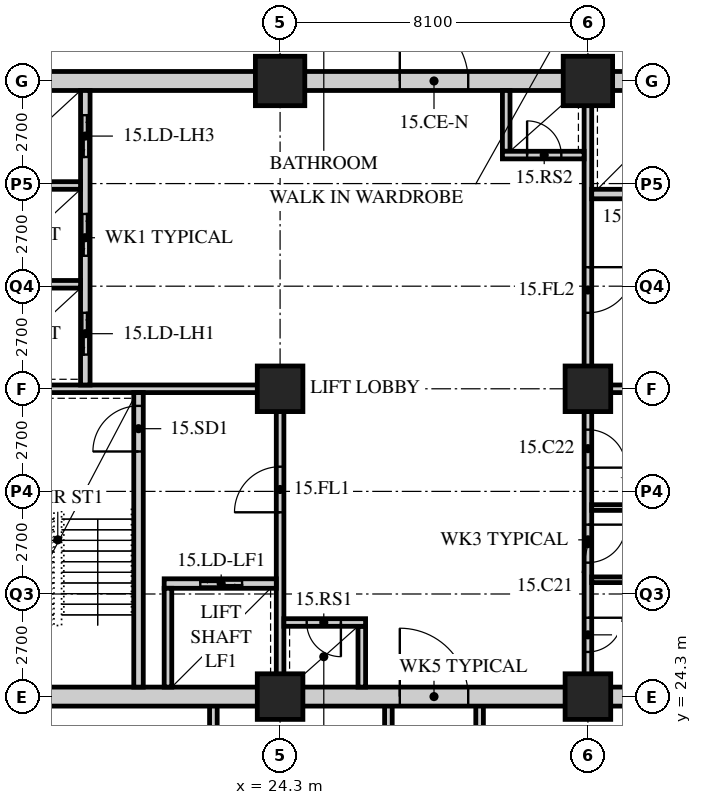
"""IFC4 building model, lengths in metres.
Left out: names, types, materials, properties, quantities, classifications, styles, units other than length and angle.
Written with IfcOpenShell. Run it as: python <this file> out.ifc"""

import sys

from ifc_helpers import new_model, si_unit, direction, frame, frame_2d, origin, origin_2d, place, context, subcontext, project, spatial, rectangle, hollow_rectangle, extrude, element, fill, save


model = new_model("IFC4")
c1 = context("Model", 3, precision=1e-05, world=origin(), true_north=direction((0.0, 1.0)))
c2 = subcontext(c1, "Body", "Model", "MODEL_VIEW")
j1 = project(units=[si_unit("LENGTHUNIT", "METRE"), si_unit("PLANEANGLEUNIT", "RADIAN")], contexts=[c1])
p1 = place(None, origin())
s1 = spatial("IfcSite", under=j1, at=p1, CompositionType="ELEMENT")
p2 = place(p1, origin())
s2 = spatial("IfcBuilding", under=s1, at=p2, CompositionType="ELEMENT")
p3 = place(p2, frame((0.0, 0.0, 63.6)))
s3 = spatial("IfcBuildingStorey", under=s2, at=p3, CompositionType="ELEMENT", Elevation=63.6)
for number, where, z_axis, x_axis in (
    (1, (24.3, 24.3, 0.0), (0.0, 0.0, 1.0), (1.0, 0.0, 0.0)),
    (2, (24.3, 32.4, 0.0), (0.0, 0.0, 1.0), (1.0, 0.0, 0.0)),
):
    element("IfcColumn", number, at=place(p3, frame(where, z_axis=z_axis, x_axis=x_axis)), inside=s3, PredefinedType="COLUMN", context=c2, shape_type="SweptSolid", body=[
        extrude(hollow_rectangle(XDim=1.2, YDim=1.2, WallThickness=0.12, at=origin_2d()), origin(), (0.0, 0.0, 1.0), 3.4),
    ])
p4 = place(p3, frame((24.3, 40.5, 0.0), z_axis=(0.0, 0.0, 1.0), x_axis=(1.0, 0.0, 0.0)))
e3 = element("IfcColumn", 3, at=p4, inside=s3, PredefinedType="COLUMN", context=c2, shape_type="SweptSolid", body=[
    extrude(hollow_rectangle(XDim=1.3, YDim=1.3, WallThickness=0.13, at=origin_2d()), origin(), (0.0, 0.0, 1.0), 3.4),
])
for number, where, z_axis, x_axis in (
    (4, (32.4, 24.3, 0.0), (0.0, 0.0, 1.0), (1.0, 0.0, 0.0)),
    (5, (32.4, 32.4, 0.0), (0.0, 0.0, 1.0), (1.0, 0.0, 0.0)),
):
    element("IfcColumn", number, at=place(p3, frame(where, z_axis=z_axis, x_axis=x_axis)), inside=s3, PredefinedType="COLUMN", context=c2, shape_type="SweptSolid", body=[
        extrude(hollow_rectangle(XDim=1.2, YDim=1.2, WallThickness=0.12, at=origin_2d()), origin(), (0.0, 0.0, 1.0), 3.4),
    ])
p5 = place(p3, frame((32.4, 40.5, 0.0), z_axis=(0.0, 0.0, 1.0), x_axis=(1.0, 0.0, 0.0)))
e6 = element("IfcColumn", 6, at=p5, inside=s3, PredefinedType="COLUMN", context=c2, shape_type="SweptSolid", body=[
    extrude(hollow_rectangle(XDim=1.3, YDim=1.3, WallThickness=0.13, at=origin_2d()), origin(), (0.0, 0.0, 1.0), 3.4),
])
for number, where, z_axis, x_axis in (
    (7, (22.545, 13.95, 0.0), (0.0, 0.0, 1.0), (0.0, 1.0, 0.0)),
    (8, (27.15, 13.95, 0.0), (0.0, 0.0, 1.0), (0.0, 1.0, 0.0)),
    (9, (29.55, 13.95, 0.0), (0.0, 0.0, 1.0), (0.0, 1.0, 0.0)),
):
    element("IfcWall", number, at=place(p3, frame(where, z_axis=z_axis, x_axis=x_axis)), inside=s3, PredefinedType="SOLIDWALL", context=c2, shape_type="SweptSolid", body=[
        extrude(rectangle(XDim=10.35, YDim=0.2, at=frame_2d((5.175, 0.0))), origin(), (0.0, 0.0, 1.0), 3.19),
    ])
p6 = place(p3, frame((15.95, 24.3, 0.0), z_axis=(0.0, 0.0, 1.0), x_axis=(1.0, 0.0, 0.0)))
e10 = element("IfcWall", 10, at=p6, inside=s3, PredefinedType="SOLIDWALL", context=c2, shape_type="SweptSolid", body=[
    extrude(rectangle(XDim=24.8, YDim=0.5, at=frame_2d((12.4, 0.0))), origin(), (0.0, 0.0, 1.0), 2.54),
])
p7 = place(p6, frame((11.5, 0.0, 0.0)))
e11 = element("IfcOpeningElement", 11, at=p7, cuts=e10, PredefinedType="OPENING", context=c2, shape_type="SweptSolid", body=[
    extrude(rectangle(XDim=1.8, YDim=2.4, at=frame_2d((0.9, 1.2))), frame((0.0, 0.26, 0.0), z_axis=(0.0, -1.0, 0.0), x_axis=(1.0, 0.0, 0.0)), (0.0, 0.0, 1.0), 0.52),
])
p8 = place(p3, frame((15.95, 40.5, 0.0), z_axis=(0.0, 0.0, 1.0), x_axis=(1.0, 0.0, 0.0)))
e12 = element("IfcWall", 12, at=p8, inside=s3, PredefinedType="SOLIDWALL", context=c2, shape_type="SweptSolid", body=[
    extrude(rectangle(XDim=24.8, YDim=0.5, at=frame_2d((12.4, 0.0))), origin(), (0.0, 0.0, 1.0), 2.54),
])
p9 = place(p8, frame((11.5, 0.0, 0.0)))
e13 = element("IfcOpeningElement", 13, at=p9, cuts=e12, PredefinedType="OPENING", context=c2, shape_type="SweptSolid", body=[
    extrude(rectangle(XDim=1.8, YDim=2.4, at=frame_2d((0.9, 1.2))), frame((0.0, 0.26, 0.0), z_axis=(0.0, -1.0, 0.0), x_axis=(1.0, 0.0, 0.0)), (0.0, 0.0, 1.0), 0.52),
])
p10 = place(p3, frame((16.45, 32.4, 0.0), z_axis=(0.0, 0.0, 1.0), x_axis=(1.0, 0.0, 0.0)))
e14 = element("IfcWall", 14, at=p10, inside=s3, PredefinedType="SOLIDWALL", context=c2, shape_type="SweptSolid", body=[
    extrude(rectangle(XDim=7.95, YDim=0.2, at=frame_2d((3.975, 0.0))), origin(), (0.0, 0.0, 1.0), 2.578),
])
p11 = place(p3, frame((24.3, 24.55, 0.0), z_axis=(0.0, 0.0, 1.0), x_axis=(0.0, 1.0, 0.0)))
e15 = element("IfcWall", 15, at=p11, inside=s3, PredefinedType="SOLIDWALL", context=c2, shape_type="SweptSolid", body=[
    extrude(rectangle(XDim=7.75, YDim=0.2, at=frame_2d((3.875, 0.0))), origin(), (0.0, 0.0, 1.0), 2.578),
])
p12 = place(p11, frame((4.6, 0.0, 0.0)))
e16 = element("IfcOpeningElement", 16, at=p12, cuts=e15, PredefinedType="OPENING", context=c2, shape_type="SweptSolid", body=[
    extrude(rectangle(XDim=1.2, YDim=2.1, at=frame_2d((0.6, 1.05))), frame((0.0, 0.11, 0.0), z_axis=(0.0, -1.0, 0.0), x_axis=(1.0, 0.0, 0.0)), (0.0, 0.0, 1.0), 0.22),
])
p13 = place(p3, frame((20.575, 24.55, 0.0), z_axis=(0.0, 0.0, 1.0), x_axis=(0.0, 1.0, 0.0)))
e17 = element("IfcWall", 17, at=p13, inside=s3, PredefinedType="SOLIDWALL", context=c2, shape_type="SweptSolid", body=[
    extrude(rectangle(XDim=7.75, YDim=0.25, at=frame_2d((3.875, 0.0))), origin(), (0.0, 0.0, 1.0), 3.19),
])
p14 = place(p13, frame((6.2, 0.0, 0.0)))
e18 = element("IfcOpeningElement", 18, at=p14, cuts=e17, PredefinedType="OPENING", context=c2, shape_type="SweptSolid", body=[
    extrude(rectangle(XDim=1.2, YDim=2.1, at=frame_2d((0.6, 1.05))), frame((0.0, 0.135, 0.0), z_axis=(0.0, -1.0, 0.0), x_axis=(1.0, 0.0, 0.0)), (0.0, 0.0, 1.0), 0.27),
])
p15 = place(p3, frame((21.25, 27.275, 0.0), z_axis=(0.0, 0.0, 1.0), x_axis=(1.0, 0.0, 0.0)))
e19 = element("IfcWall", 19, at=p15, inside=s3, PredefinedType="SOLIDWALL", context=c2, shape_type="SweptSolid", body=[
    extrude(rectangle(XDim=2.95, YDim=0.25, at=frame_2d((1.475, 0.0))), origin(), (0.0, 0.0, 1.0), 3.19),
])
p16 = place(p15, frame((0.95, 0.0, 0.0)))
e20 = element("IfcOpeningElement", 20, at=p16, cuts=e19, PredefinedType="OPENING", context=c2, shape_type="SweptSolid", body=[
    extrude(rectangle(XDim=1.1, YDim=2.4, at=frame_2d((0.55, 1.2))), frame((0.0, 0.135, 0.0), z_axis=(0.0, -1.0, 0.0), x_axis=(1.0, 0.0, 0.0)), (0.0, 0.0, 1.0), 0.27),
])
p17 = place(p3, frame((21.35, 24.55, 0.0), z_axis=(0.0, 0.0, 1.0), x_axis=(0.0, 1.0, 0.0)))
e21 = element("IfcWall", 21, at=p17, inside=s3, PredefinedType="SOLIDWALL", context=c2, shape_type="SweptSolid", body=[
    extrude(rectangle(XDim=2.6, YDim=0.2, at=frame_2d((1.3, 0.0))), origin(), (0.0, 0.0, 1.0), 3.19),
])
p18 = place(p3, frame((19.175, 32.5, 0.0), z_axis=(0.0, 0.0, 1.0), x_axis=(0.0, 1.0, 0.0)))
e22 = element("IfcWall", 22, at=p18, inside=s3, PredefinedType="SOLIDWALL", context=c2, shape_type="SweptSolid", body=[
    extrude(rectangle(XDim=7.75, YDim=0.25, at=frame_2d((3.875, 0.0))), origin(), (0.0, 0.0, 1.0), 3.19),
])
p19 = place(p18, frame((0.8, 0.0, 0.0)))
e23 = element("IfcOpeningElement", 23, at=p19, cuts=e22, PredefinedType="OPENING", context=c2, shape_type="SweptSolid", body=[
    extrude(rectangle(XDim=1.1, YDim=2.4, at=frame_2d((0.55, 1.2))), frame((0.0, 0.135, 0.0), z_axis=(0.0, -1.0, 0.0), x_axis=(1.0, 0.0, 0.0)), (0.0, 0.0, 1.0), 0.27),
])
p20 = place(p18, frame((3.4, 0.0, 0.0)))
e24 = element("IfcOpeningElement", 24, at=p20, cuts=e22, PredefinedType="OPENING", context=c2, shape_type="SweptSolid", body=[
    extrude(rectangle(XDim=1.1, YDim=2.4, at=frame_2d((0.55, 1.2))), frame((0.0, 0.135, 0.0), z_axis=(0.0, -1.0, 0.0), x_axis=(1.0, 0.0, 0.0)), (0.0, 0.0, 1.0), 0.27),
])
p21 = place(p18, frame((6.0, 0.0, 0.0)))
e25 = element("IfcOpeningElement", 25, at=p21, cuts=e22, PredefinedType="OPENING", context=c2, shape_type="SweptSolid", body=[
    extrude(rectangle(XDim=1.1, YDim=2.4, at=frame_2d((0.55, 1.2))), frame((0.0, 0.135, 0.0), z_axis=(0.0, -1.0, 0.0), x_axis=(1.0, 0.0, 0.0)), (0.0, 0.0, 1.0), 0.27),
])
for number, where, z_axis, x_axis in (
    (26, (16.45, 35.15, 0.0), (0.0, 0.0, 1.0), (1.0, 0.0, 0.0)),
    (27, (16.45, 37.75, 0.0), (0.0, 0.0, 1.0), (1.0, 0.0, 0.0)),
):
    element("IfcWall", number, at=place(p3, frame(where, z_axis=z_axis, x_axis=x_axis)), inside=s3, PredefinedType="SOLIDWALL", context=c2, shape_type="SweptSolid", body=[
        extrude(rectangle(XDim=2.6, YDim=0.2, at=frame_2d((1.3, 0.0))), origin(), (0.0, 0.0, 1.0), 3.19),
    ])
p22 = place(p3, frame((26.45, 24.55, 0.0), z_axis=(0.0, 0.0, 1.0), x_axis=(0.0, 1.0, 0.0)))
e28 = element("IfcWall", 28, at=p22, inside=s3, PredefinedType="SOLIDWALL", context=c2, shape_type="SweptSolid", body=[
    extrude(rectangle(XDim=1.6, YDim=0.2, at=frame_2d((0.8, 0.0))), origin(), (0.0, 0.0, 1.0), 3.19),
])
p23 = place(p3, frame((24.4, 26.25, 0.0), z_axis=(0.0, 0.0, 1.0), x_axis=(1.0, 0.0, 0.0)))
e29 = element("IfcWall", 29, at=p23, inside=s3, PredefinedType="SOLIDWALL", context=c2, shape_type="SweptSolid", body=[
    extrude(rectangle(XDim=2.15, YDim=0.2, at=frame_2d((1.075, 0.0))), origin(), (0.0, 0.0, 1.0), 3.19),
])
p24 = place(p23, frame((0.6, 0.0, 0.0)))
e30 = element("IfcOpeningElement", 30, at=p24, cuts=e29, PredefinedType="OPENING", context=c2, shape_type="SweptSolid", body=[
    extrude(rectangle(XDim=0.9, YDim=2.1, at=frame_2d((0.45, 1.05))), frame((0.0, 0.11, 0.0), z_axis=(0.0, -1.0, 0.0), x_axis=(1.0, 0.0, 0.0)), (0.0, 0.0, 1.0), 0.22),
])
p25 = place(p3, frame((32.3, 32.4, 0.0), z_axis=(0.0, 0.0, 1.0), x_axis=(1.0, 0.0, 0.0)))
e31 = element("IfcWall", 31, at=p25, inside=s3, PredefinedType="SOLIDWALL", context=c2, shape_type="SweptSolid", body=[
    extrude(rectangle(XDim=7.95, YDim=0.2, at=frame_2d((3.975, 0.0))), origin(), (0.0, 0.0, 1.0), 2.578),
])
p26 = place(p3, frame((32.4, 32.5, 0.0), z_axis=(0.0, 0.0, 1.0), x_axis=(0.0, 1.0, 0.0)))
e32 = element("IfcWall", 32, at=p26, inside=s3, PredefinedType="SOLIDWALL", context=c2, shape_type="SweptSolid", body=[
    extrude(rectangle(XDim=7.75, YDim=0.2, at=frame_2d((3.875, 0.0))), origin(), (0.0, 0.0, 1.0), 2.578),
])
p27 = place(p26, frame((1.9, 0.0, 0.0)))
e33 = element("IfcOpeningElement", 33, at=p27, cuts=e32, PredefinedType="OPENING", context=c2, shape_type="SweptSolid", body=[
    extrude(rectangle(XDim=1.2, YDim=2.1, at=frame_2d((0.6, 1.05))), frame((0.0, 0.11, 0.0), z_axis=(0.0, -1.0, 0.0), x_axis=(1.0, 0.0, 0.0)), (0.0, 0.0, 1.0), 0.22),
])
p28 = place(p3, frame((32.5, 37.525, 0.0), z_axis=(0.0, 0.0, 1.0), x_axis=(1.0, 0.0, 0.0)))
e34 = element("IfcWall", 34, at=p28, inside=s3, PredefinedType="SOLIDWALL", context=c2, shape_type="SweptSolid", body=[
    extrude(rectangle(XDim=2.95, YDim=0.25, at=frame_2d((1.475, 0.0))), origin(), (0.0, 0.0, 1.0), 3.19),
])
p29 = place(p28, frame((0.9, 0.0, 0.0)))
e35 = element("IfcOpeningElement", 35, at=p29, cuts=e34, PredefinedType="OPENING", context=c2, shape_type="SweptSolid", body=[
    extrude(rectangle(XDim=1.1, YDim=2.4, at=frame_2d((0.55, 1.2))), frame((0.0, 0.135, 0.0), z_axis=(0.0, -1.0, 0.0), x_axis=(1.0, 0.0, 0.0)), (0.0, 0.0, 1.0), 0.27),
])
p30 = place(p3, frame((30.25, 38.65, 0.0), z_axis=(0.0, 0.0, 1.0), x_axis=(0.0, 1.0, 0.0)))
e36 = element("IfcWall", 36, at=p30, inside=s3, PredefinedType="SOLIDWALL", context=c2, shape_type="SweptSolid", body=[
    extrude(rectangle(XDim=1.6, YDim=0.2, at=frame_2d((0.8, 0.0))), origin(), (0.0, 0.0, 1.0), 3.19),
])
p31 = place(p3, frame((30.15, 38.55, 0.0), z_axis=(0.0, 0.0, 1.0), x_axis=(1.0, 0.0, 0.0)))
e37 = element("IfcWall", 37, at=p31, inside=s3, PredefinedType="SOLIDWALL", context=c2, shape_type="SweptSolid", body=[
    extrude(rectangle(XDim=2.15, YDim=0.2, at=frame_2d((1.075, 0.0))), origin(), (0.0, 0.0, 1.0), 3.19),
])
p32 = place(p31, frame((0.65, 0.0, 0.0)))
e38 = element("IfcOpeningElement", 38, at=p32, cuts=e37, PredefinedType="OPENING", context=c2, shape_type="SweptSolid", body=[
    extrude(rectangle(XDim=0.9, YDim=2.1, at=frame_2d((0.45, 1.05))), frame((0.0, 0.11, 0.0), z_axis=(0.0, -1.0, 0.0), x_axis=(1.0, 0.0, 0.0)), (0.0, 0.0, 1.0), 0.22),
])
p33 = place(p3, frame((32.4, 24.55, 0.0), z_axis=(0.0, 0.0, 1.0), x_axis=(0.0, 1.0, 0.0)))
e39 = element("IfcWall", 39, at=p33, inside=s3, PredefinedType="PARTITIONING", context=c2, shape_type="SweptSolid", body=[
    extrude(rectangle(XDim=7.75, YDim=0.2, at=frame_2d((3.875, 0.0))), origin(), (0.0, 0.0, 1.0), 2.578),
])
p34 = place(p33, frame((0.925, 0.0, 0.0)))
e40 = element("IfcOpeningElement", 40, at=p34, cuts=e39, PredefinedType="OPENING", context=c2, shape_type="SweptSolid", body=[
    extrude(rectangle(XDim=0.9, YDim=2.1, at=frame_2d((0.45, 1.05))), frame((0.0, 0.11, 0.0), z_axis=(0.0, -1.0, 0.0), x_axis=(1.0, 0.0, 0.0)), (0.0, 0.0, 1.0), 0.22),
])
p35 = place(p33, frame((3.275, 0.0, 0.0)))
e41 = element("IfcOpeningElement", 41, at=p35, cuts=e39, PredefinedType="OPENING", context=c2, shape_type="SweptSolid", body=[
    extrude(rectangle(XDim=1.0, YDim=2.1, at=frame_2d((0.5, 1.05))), frame((0.0, 0.11, 0.0), z_axis=(0.0, -1.0, 0.0), x_axis=(1.0, 0.0, 0.0)), (0.0, 0.0, 1.0), 0.22),
])
p36 = place(p33, frame((5.775, 0.0, 0.0)))
e42 = element("IfcOpeningElement", 42, at=p36, cuts=e39, PredefinedType="OPENING", context=c2, shape_type="SweptSolid", body=[
    extrude(rectangle(XDim=1.0, YDim=2.1, at=frame_2d((0.5, 1.05))), frame((0.0, 0.11, 0.0), z_axis=(0.0, -1.0, 0.0), x_axis=(1.0, 0.0, 0.0)), (0.0, 0.0, 1.0), 0.22),
])
p37 = place(p3, frame((32.5, 27.375, 0.0), z_axis=(0.0, 0.0, 1.0), x_axis=(1.0, 0.0, 0.0)))
e43 = element("IfcWall", 43, at=p37, inside=s3, PredefinedType="PARTITIONING", context=c2, shape_type="SweptSolid", body=[
    extrude(rectangle(XDim=2.15, YDim=0.15, at=frame_2d((1.075, 0.0))), origin(), (0.0, 0.0, 1.0), 3.19),
])
p38 = place(p3, frame((32.5, 29.275, 0.0), z_axis=(0.0, 0.0, 1.0), x_axis=(1.0, 0.0, 0.0)))
e44 = element("IfcWall", 44, at=p38, inside=s3, PredefinedType="PARTITIONING", context=c2, shape_type="SweptSolid", body=[
    extrude(rectangle(XDim=4.9, YDim=0.15, at=frame_2d((2.45, 0.0))), origin(), (0.0, 0.0, 1.0), 3.19),
])
p39 = place(p34, origin())
e45 = element("IfcDoor", 45, at=p39, inside=s3, OperationType="SINGLE_SWING_LEFT", PredefinedType="DOOR", context=c2, shape_type="SweptSolid", body=[
    extrude(rectangle(XDim=0.9, YDim=2.1, at=frame_2d((0.45, 1.05))), frame((0.0, 0.025, 0.0), z_axis=(0.0, -1.0, 0.0), x_axis=(1.0, 0.0, 0.0)), (0.0, 0.0, 1.0), 0.05),
])
fill(e40, e45)
p40 = place(p35, origin())
e46 = element("IfcDoor", 46, at=p40, inside=s3, OperationType="SINGLE_SWING_LEFT", PredefinedType="DOOR", context=c2, shape_type="SweptSolid", body=[
    extrude(rectangle(XDim=1.0, YDim=2.1, at=frame_2d((0.5, 1.05))), frame((0.0, 0.025, 0.0), z_axis=(0.0, -1.0, 0.0), x_axis=(1.0, 0.0, 0.0)), (0.0, 0.0, 1.0), 0.05),
])
fill(e41, e46)
p41 = place(p36, origin())
e47 = element("IfcDoor", 47, at=p41, inside=s3, OperationType="SINGLE_SWING_RIGHT", PredefinedType="DOOR", context=c2, shape_type="SweptSolid", body=[
    extrude(rectangle(XDim=1.0, YDim=2.1, at=frame_2d((0.5, 1.05))), frame((0.0, 0.025, 0.0), z_axis=(0.0, -1.0, 0.0), x_axis=(1.0, 0.0, 0.0)), (0.0, 0.0, 1.0), 0.05),
])
fill(e42, e47)
p42 = place(p14, origin())
e48 = element("IfcDoor", 48, at=p42, inside=s3, OperationType="SINGLE_SWING_LEFT", PredefinedType="DOOR", context=c2, shape_type="SweptSolid", body=[
    extrude(rectangle(XDim=1.2, YDim=2.1, at=frame_2d((0.6, 1.05))), frame((0.0, 0.025, 0.0), z_axis=(0.0, -1.0, 0.0), x_axis=(1.0, 0.0, 0.0)), (0.0, 0.0, 1.0), 0.05),
])
fill(e18, e48)
p43 = place(p12, origin())
e49 = element("IfcDoor", 49, at=p43, inside=s3, OperationType="SINGLE_SWING_LEFT", PredefinedType="DOOR", context=c2, shape_type="SweptSolid", body=[
    extrude(rectangle(XDim=1.2, YDim=2.1, at=frame_2d((0.6, 1.05))), frame((0.0, 0.025, 0.0), z_axis=(0.0, -1.0, 0.0), x_axis=(1.0, 0.0, 0.0)), (0.0, 0.0, 1.0), 0.05),
])
fill(e16, e49)
p44 = place(p24, origin())
e50 = element("IfcDoor", 50, at=p44, inside=s3, OperationType="SINGLE_SWING_LEFT", PredefinedType="DOOR", context=c2, shape_type="SweptSolid", body=[
    extrude(rectangle(XDim=0.9, YDim=2.1, at=frame_2d((0.45, 1.05))), frame((0.0, 0.025, 0.0), z_axis=(0.0, -1.0, 0.0), x_axis=(1.0, 0.0, 0.0)), (0.0, 0.0, 1.0), 0.05),
])
fill(e30, e50)
p45 = place(p27, origin())
e51 = element("IfcDoor", 51, at=p45, inside=s3, OperationType="SINGLE_SWING_LEFT", PredefinedType="DOOR", context=c2, shape_type="SweptSolid", body=[
    extrude(rectangle(XDim=1.2, YDim=2.1, at=frame_2d((0.6, 1.05))), frame((0.0, 0.025, 0.0), z_axis=(0.0, -1.0, 0.0), x_axis=(1.0, 0.0, 0.0)), (0.0, 0.0, 1.0), 0.05),
])
fill(e33, e51)
p46 = place(p32, origin())
e52 = element("IfcDoor", 52, at=p46, inside=s3, OperationType="SINGLE_SWING_LEFT", PredefinedType="DOOR", context=c2, shape_type="SweptSolid", body=[
    extrude(rectangle(XDim=0.9, YDim=2.1, at=frame_2d((0.45, 1.05))), frame((0.0, 0.025, 0.0), z_axis=(0.0, -1.0, 0.0), x_axis=(1.0, 0.0, 0.0)), (0.0, 0.0, 1.0), 0.05),
])
fill(e38, e52)
p47 = place(p19, origin())
e53 = element("IfcDoor", 53, at=p47, inside=s3, OperationType="DOUBLE_DOOR_SLIDING", PredefinedType="DOOR", context=c2, shape_type="SweptSolid", body=[
    extrude(rectangle(XDim=1.1, YDim=2.4, at=frame_2d((0.55, 1.2))), frame((0.0, 0.025, 0.0), z_axis=(0.0, -1.0, 0.0), x_axis=(1.0, 0.0, 0.0)), (0.0, 0.0, 1.0), 0.05),
])
fill(e23, e53)
p48 = place(p20, origin())
e54 = element("IfcDoor", 54, at=p48, inside=s3, OperationType="DOUBLE_DOOR_SLIDING", PredefinedType="DOOR", context=c2, shape_type="SweptSolid", body=[
    extrude(rectangle(XDim=1.1, YDim=2.4, at=frame_2d((0.55, 1.2))), frame((0.0, 0.025, 0.0), z_axis=(0.0, -1.0, 0.0), x_axis=(1.0, 0.0, 0.0)), (0.0, 0.0, 1.0), 0.05),
])
fill(e24, e54)
p49 = place(p21, origin())
e55 = element("IfcDoor", 55, at=p49, inside=s3, OperationType="DOUBLE_DOOR_SLIDING", PredefinedType="DOOR", context=c2, shape_type="SweptSolid", body=[
    extrude(rectangle(XDim=1.1, YDim=2.4, at=frame_2d((0.55, 1.2))), frame((0.0, 0.025, 0.0), z_axis=(0.0, -1.0, 0.0), x_axis=(1.0, 0.0, 0.0)), (0.0, 0.0, 1.0), 0.05),
])
fill(e25, e55)
p50 = place(p16, origin())
e56 = element("IfcDoor", 56, at=p50, inside=s3, OperationType="DOUBLE_DOOR_SLIDING", PredefinedType="DOOR", context=c2, shape_type="SweptSolid", body=[
    extrude(rectangle(XDim=1.1, YDim=2.4, at=frame_2d((0.55, 1.2))), frame((0.0, 0.025, 0.0), z_axis=(0.0, -1.0, 0.0), x_axis=(1.0, 0.0, 0.0)), (0.0, 0.0, 1.0), 0.05),
])
fill(e20, e56)
p51 = place(p7, origin())
e57 = element("IfcDoor", 57, at=p51, inside=s3, OperationType="DOUBLE_DOOR_SINGLE_SWING", PredefinedType="DOOR", context=c2, shape_type="SweptSolid", body=[
    extrude(rectangle(XDim=1.8, YDim=2.4, at=frame_2d((0.9, 1.2))), frame((0.0, 0.025, 0.0), z_axis=(0.0, -1.0, 0.0), x_axis=(1.0, 0.0, 0.0)), (0.0, 0.0, 1.0), 0.05),
])
fill(e11, e57)
p52 = place(p9, origin())
e58 = element("IfcDoor", 58, at=p52, inside=s3, OperationType="DOUBLE_DOOR_SINGLE_SWING", PredefinedType="DOOR", context=c2, shape_type="SweptSolid", body=[
    extrude(rectangle(XDim=1.8, YDim=2.4, at=frame_2d((0.9, 1.2))), frame((0.0, 0.025, 0.0), z_axis=(0.0, -1.0, 0.0), x_axis=(1.0, 0.0, 0.0)), (0.0, 0.0, 1.0), 0.05),
])
fill(e13, e58)
save(model, sys.argv[1])
